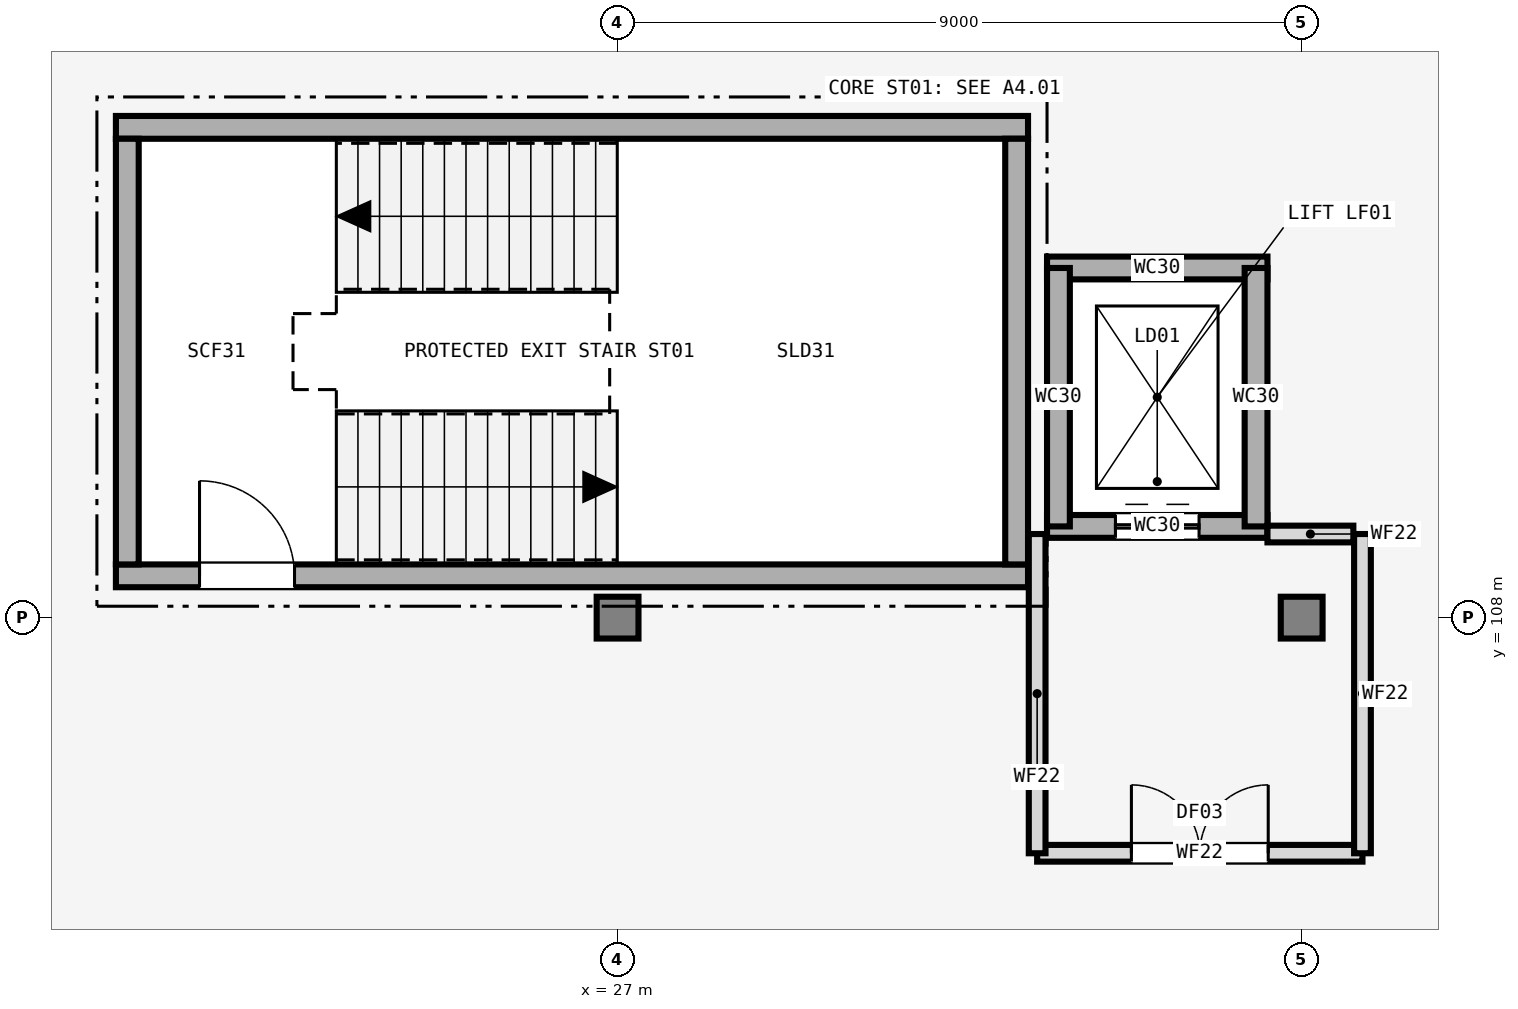
"""IFC4 building model, lengths in metres.
Left out: names, types, materials, properties, quantities, classifications, styles, units other than length and angle.
Written with IfcOpenShell. Run it as: python <this file> out.ifc"""

import sys

from ifc_helpers import new_model, si_unit, direction, frame, frame_2d, origin, origin_2d, place, context, subcontext, project, spatial, rectangle, extrude, element, fill, save


model = new_model("IFC4")
c1 = context("Model", 3, precision=1e-05, world=origin(), true_north=direction((0.0, 1.0)))
c2 = subcontext(c1, "Body", "Model", "MODEL_VIEW")
j1 = project(units=[si_unit("LENGTHUNIT", "METRE"), si_unit("PLANEANGLEUNIT", "RADIAN")], contexts=[c1])
p1 = place(None, origin())
s1 = spatial("IfcSite", under=j1, at=p1, CompositionType="ELEMENT")
p2 = place(p1, origin())
s2 = spatial("IfcBuilding", under=s1, at=p2, CompositionType="ELEMENT")
p3 = place(p2, frame((0.0, 0.0, 9.3)))
s3 = spatial("IfcBuildingStorey", under=s2, at=p3, CompositionType="ELEMENT", Elevation=9.3)
for number, where, z_axis, x_axis in (
    (1, (27.0, 108.0, 0.0), (0.0, 0.0, 1.0), (1.0, 0.0, 0.0)),
    (2, (36.0, 108.0, 0.0), (0.0, 0.0, 1.0), (1.0, 0.0, 0.0)),
):
    element("IfcColumn", number, at=place(p3, frame(where, z_axis=z_axis, x_axis=x_axis)), inside=s3, PredefinedType="COLUMN", context=c2, shape_type="SweptSolid", body=[
        extrude(rectangle(XDim=0.55, YDim=0.55, at=origin_2d()), origin(), (0.0, 0.0, 1.0), 4.2),
    ])
p4 = place(p3, frame((20.4, 108.55, 0.0), z_axis=(0.0, 0.0, 1.0), x_axis=(1.0, 0.0, 0.0)))
e3 = element("IfcWall", 3, at=p4, inside=s3, PredefinedType="SHEAR", context=c2, shape_type="SweptSolid", body=[
    extrude(rectangle(XDim=12.0, YDim=0.3, at=frame_2d((6.0, 0.0))), origin(), (0.0, 0.0, 1.0), 4.2),
])
p5 = place(p4, frame((1.1, 0.0, 0.0)))
e4 = element("IfcOpeningElement", 4, at=p5, cuts=e3, PredefinedType="OPENING", context=c2, shape_type="SweptSolid", body=[
    extrude(rectangle(XDim=1.25, YDim=2.15, at=frame_2d((0.625, 1.075))), frame((0.0, 0.16, 0.0), z_axis=(0.0, -1.0, 0.0), x_axis=(1.0, 0.0, 0.0)), (0.0, 0.0, 1.0), 0.32),
])
p6 = place(p3, frame((32.4, 114.45, 0.0), z_axis=(0.0, 0.0, 1.0), x_axis=(-1.0, 0.0, 0.0)))
e5 = element("IfcWall", 5, at=p6, inside=s3, PredefinedType="SHEAR", context=c2, shape_type="SweptSolid", body=[
    extrude(rectangle(XDim=12.0, YDim=0.3, at=frame_2d((6.0, 0.0))), origin(), (0.0, 0.0, 1.0), 4.2),
])
for number, where, z_axis, x_axis in (
    (6, (20.55, 114.3, 0.0), (0.0, 0.0, 1.0), (0.0, -1.0, 0.0)),
    (7, (32.25, 108.7, 0.0), (0.0, 0.0, 1.0), (0.0, 1.0, 0.0)),
):
    element("IfcWall", number, at=place(p3, frame(where, z_axis=z_axis, x_axis=x_axis)), inside=s3, PredefinedType="SHEAR", context=c2, shape_type="SweptSolid", body=[
        extrude(rectangle(XDim=5.6, YDim=0.3, at=frame_2d((2.8, 0.0))), origin(), (0.0, 0.0, 1.0), 4.2),
    ])
p7 = place(p3, frame((32.65, 109.2, 0.0), z_axis=(0.0, 0.0, 1.0), x_axis=(1.0, 0.0, 0.0)))
e8 = element("IfcWall", 8, at=p7, inside=s3, PredefinedType="SHEAR", context=c2, shape_type="SweptSolid", body=[
    extrude(rectangle(XDim=2.9, YDim=0.3, at=frame_2d((1.45, 0.0))), origin(), (0.0, 0.0, 1.0), 4.2),
])
p8 = place(p7, frame((0.9, 0.0, 0.0)))
e9 = element("IfcOpeningElement", 9, at=p8, cuts=e8, PredefinedType="OPENING", context=c2, shape_type="SweptSolid", body=[
    extrude(rectangle(XDim=1.1, YDim=2.15, at=frame_2d((0.55, 1.075))), frame((0.0, 0.16, 0.0), z_axis=(0.0, -1.0, 0.0), x_axis=(1.0, 0.0, 0.0)), (0.0, 0.0, 1.0), 0.32),
])
p9 = place(p3, frame((35.55, 112.6, 0.0), z_axis=(0.0, 0.0, 1.0), x_axis=(-1.0, 0.0, 0.0)))
e10 = element("IfcWall", 10, at=p9, inside=s3, PredefinedType="SHEAR", context=c2, shape_type="SweptSolid", body=[
    extrude(rectangle(XDim=2.9, YDim=0.3, at=frame_2d((1.45, 0.0))), origin(), (0.0, 0.0, 1.0), 4.2),
])
for number, where, z_axis, x_axis in (
    (11, (32.8, 112.6, 0.0), (0.0, 0.0, 1.0), (0.0, -1.0, 0.0)),
    (12, (35.4, 109.2, 0.0), (0.0, 0.0, 1.0), (0.0, 1.0, 0.0)),
):
    element("IfcWall", number, at=place(p3, frame(where, z_axis=z_axis, x_axis=x_axis)), inside=s3, PredefinedType="SHEAR", context=c2, shape_type="SweptSolid", body=[
        extrude(rectangle(XDim=3.4, YDim=0.3, at=frame_2d((1.7, 0.0))), origin(), (0.0, 0.0, 1.0), 4.2),
    ])
p10 = place(p3, frame((32.52, 104.9, 0.0), z_axis=(0.0, 0.0, 1.0), x_axis=(1.0, 0.0, 0.0)))
e13 = element("IfcWall", 13, at=p10, inside=s3, PredefinedType="SOLIDWALL", context=c2, shape_type="SweptSolid", body=[
    extrude(rectangle(XDim=4.28, YDim=0.22, at=frame_2d((2.14, 0.0))), origin(), (0.0, 0.0, 1.0), 3.12),
])
p11 = place(p10, frame((1.24, 0.0, 0.0)))
e14 = element("IfcOpeningElement", 14, at=p11, cuts=e13, PredefinedType="OPENING", context=c2, shape_type="SweptSolid", body=[
    extrude(rectangle(XDim=1.8, YDim=2.2, at=frame_2d((0.9, 1.1))), frame((0.0, 0.12, 0.0), z_axis=(0.0, -1.0, 0.0), x_axis=(1.0, 0.0, 0.0)), (0.0, 0.0, 1.0), 0.24),
])
for number, where, z_axis, x_axis in (
    (15, (32.52, 104.9, 0.0), (0.0, 0.0, 1.0), (0.0, 1.0, 0.0)),
    (16, (36.8, 104.9, 0.0), (0.0, 0.0, 1.0), (0.0, 1.0, 0.0)),
):
    element("IfcWall", number, at=place(p3, frame(where, z_axis=z_axis, x_axis=x_axis)), inside=s3, PredefinedType="SOLIDWALL", context=c2, shape_type="SweptSolid", body=[
        extrude(rectangle(XDim=4.2, YDim=0.22, at=frame_2d((2.1, 0.0))), origin(), (0.0, 0.0, 1.0), 3.12),
    ])
p12 = place(p3, frame((35.55, 109.1, 0.0), z_axis=(0.0, 0.0, 1.0), x_axis=(1.0, 0.0, 0.0)))
e17 = element("IfcWall", 17, at=p12, inside=s3, PredefinedType="SOLIDWALL", context=c2, shape_type="SweptSolid", body=[
    extrude(rectangle(XDim=1.13, YDim=0.22, at=frame_2d((0.565, 0.0))), origin(), (0.0, 0.0, 1.0), 3.12),
])
p13 = place(p5, origin())
e18 = element("IfcDoor", 18, at=p13, inside=s3, OperationType="SINGLE_SWING_LEFT", PredefinedType="DOOR", context=c2, shape_type="SweptSolid", body=[
    extrude(rectangle(XDim=1.25, YDim=2.15, at=frame_2d((0.625, 1.075))), frame((0.0, 0.025, 0.0), z_axis=(0.0, -1.0, 0.0), x_axis=(1.0, 0.0, 0.0)), (0.0, 0.0, 1.0), 0.05),
])
fill(e4, e18)
p14 = place(p8, origin())
e19 = element("IfcDoor", 19, at=p14, inside=s3, OperationType="DOUBLE_DOOR_SLIDING", PredefinedType="DOOR", context=c2, shape_type="SweptSolid", body=[
    extrude(rectangle(XDim=1.1, YDim=2.15, at=frame_2d((0.55, 1.075))), frame((0.0, 0.025, 0.0), z_axis=(0.0, -1.0, 0.0), x_axis=(1.0, 0.0, 0.0)), (0.0, 0.0, 1.0), 0.05),
])
fill(e9, e19)
p15 = place(p11, origin())
e20 = element("IfcDoor", 20, at=p15, inside=s3, OperationType="DOUBLE_DOOR_SINGLE_SWING", PredefinedType="DOOR", context=c2, shape_type="SweptSolid", body=[
    extrude(rectangle(XDim=1.8, YDim=2.2, at=frame_2d((0.9, 1.1))), frame((0.0, 0.025, 0.0), z_axis=(0.0, -1.0, 0.0), x_axis=(1.0, 0.0, 0.0)), (0.0, 0.0, 1.0), 0.05),
])
fill(e14, e20)
save(model, sys.argv[1])
